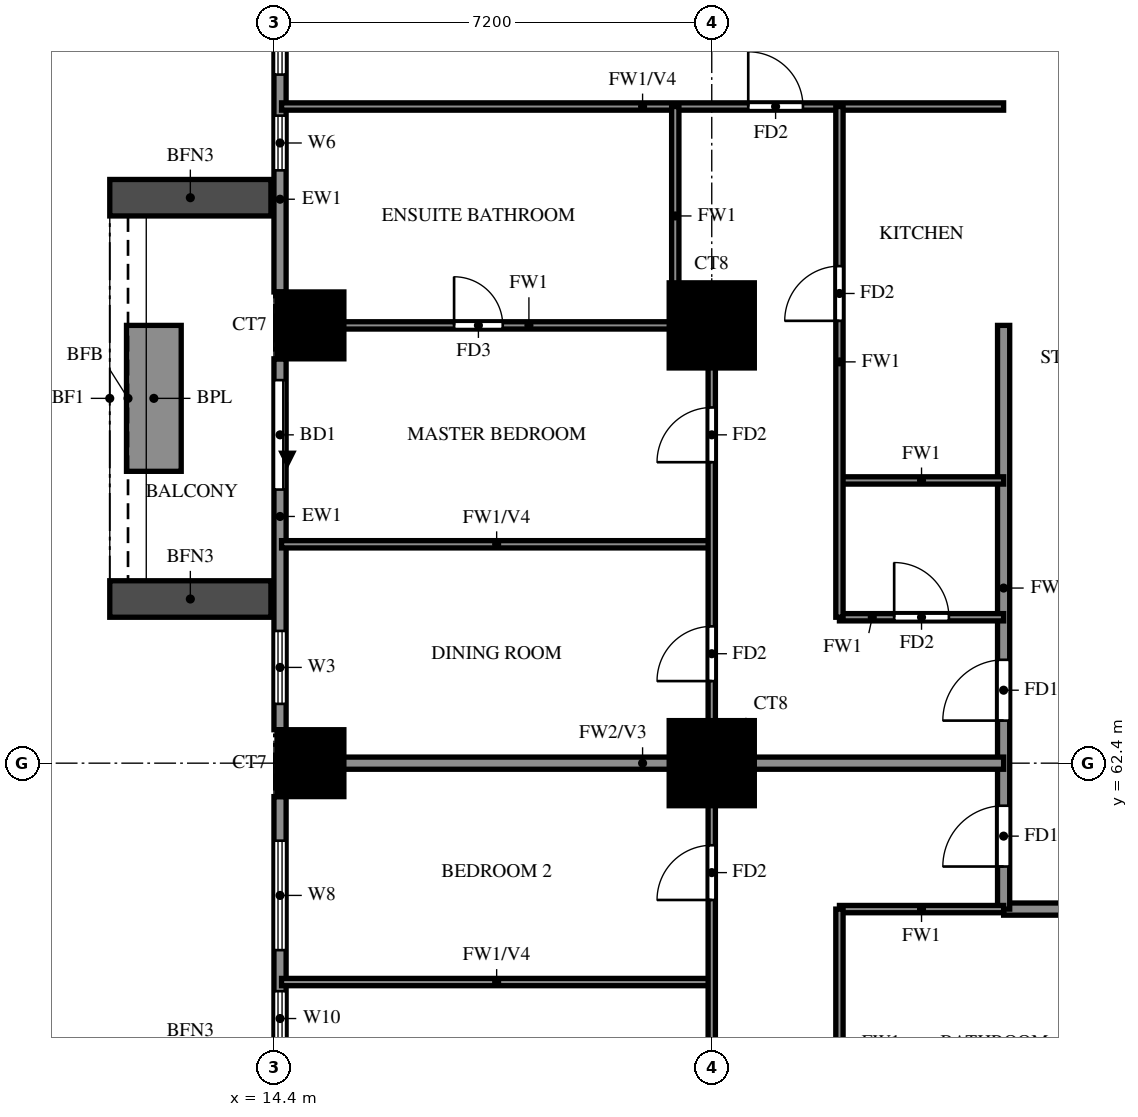
"""IFC4 building model, lengths in metres.
Left out: names, types, materials, properties, quantities, classifications, styles, units other than length and angle.
Written with IfcOpenShell. Run it as: python <this file> out.ifc"""

import sys

from ifc_helpers import new_model, si_unit, direction, frame, frame_2d, origin, origin_2d, place, context, subcontext, project, spatial, rectangle, extrude, source, transform, mapped, element, fill, save


model = new_model("IFC4")
c1 = context("Model", 3, precision=1e-05, world=origin(), true_north=direction((0.0, 1.0)))
c2 = subcontext(c1, "Body", "Model", "MODEL_VIEW")
j1 = project(units=[si_unit("LENGTHUNIT", "METRE"), si_unit("PLANEANGLEUNIT", "RADIAN")], contexts=[c1])
p1 = place(None, origin())
s1 = spatial("IfcSite", under=j1, at=p1, CompositionType="ELEMENT")
p2 = place(p1, origin())
s2 = spatial("IfcBuilding", under=s1, at=p2, CompositionType="ELEMENT")
p3 = place(p2, frame((0.0, 0.0, 34.0)))
s3 = spatial("IfcBuildingStorey", under=s2, at=p3, CompositionType="ELEMENT", Elevation=34.0)
m1 = source(origin(), c2, "Body", "SweptSolid", [
    extrude(rectangle(XDim=1.1, YDim=1.1, at=origin_2d()), origin(), (0.0, 0.0, 1.0), 3.18),
])
p4 = place(p3, frame((15.0, 62.4, 0.0), z_axis=(0.0, 0.0, 1.0), x_axis=(1.0, 0.0, 0.0)))
e1 = element("IfcColumn", 1, at=p4, inside=s3, PredefinedType="COLUMN", context=c2, shape_type="MappedRepresentation", body=[
    mapped(m1, transform((0.0, 0.0, 0.0))),
])
m2 = source(origin(), c2, "Body", "SweptSolid", [
    extrude(rectangle(XDim=1.4, YDim=1.4, at=origin_2d()), origin(), (0.0, 0.0, 1.0), 3.18),
])
p5 = place(p3, frame((21.6, 62.4, 0.0), z_axis=(0.0, 0.0, 1.0), x_axis=(1.0, 0.0, 0.0)))
e2 = element("IfcColumn", 2, at=p5, inside=s3, PredefinedType="COLUMN", context=c2, shape_type="MappedRepresentation", body=[
    mapped(m2, transform((0.0, 0.0, 0.0))),
])
p6 = place(p3, frame((15.0, 69.6, 0.0), z_axis=(0.0, 0.0, 1.0), x_axis=(1.0, 0.0, 0.0)))
e3 = element("IfcColumn", 3, at=p6, inside=s3, PredefinedType="COLUMN", context=c2, shape_type="MappedRepresentation", body=[
    mapped(m1, transform((0.0, 0.0, 0.0))),
])
p7 = place(p3, frame((21.6, 69.6, 0.0), z_axis=(0.0, 0.0, 1.0), x_axis=(1.0, 0.0, 0.0)))
e4 = element("IfcColumn", 4, at=p7, inside=s3, PredefinedType="COLUMN", context=c2, shape_type="MappedRepresentation", body=[
    mapped(m2, transform((0.0, 0.0, 0.0))),
])
p8 = place(p3, frame((14.5, 76.25, 0.0), z_axis=(0.0, 0.0, 1.0), x_axis=(0.0, -1.0, 0.0)))
e5 = element("IfcWall", 5, at=p8, inside=s3, PredefinedType="SOLIDWALL", context=c2, shape_type="SweptSolid", body=[
    extrude(rectangle(XDim=6.1, YDim=0.2, at=frame_2d((3.05, 0.0))), origin(), (0.0, 0.0, 1.0), 3.18),
])
p9 = place(p8, frame((3.2, 0.0, 1.5)))
e6 = element("IfcOpeningElement", 6, at=p9, cuts=e5, PredefinedType="OPENING", context=c2, shape_type="SweptSolid", body=[
    extrude(rectangle(XDim=0.9, YDim=0.9, at=frame_2d((0.45, 0.45))), frame((0.0, 0.11, 0.0), z_axis=(0.0, -1.0, 0.0), x_axis=(1.0, 0.0, 0.0)), (0.0, 0.0, 1.0), 0.22),
])
p10 = place(p8, frame((0.725, 0.0, 0.6)))
e7 = element("IfcOpeningElement", 7, at=p10, cuts=e5, PredefinedType="OPENING", context=c2, shape_type="SweptSolid", body=[
    extrude(rectangle(XDim=1.8, YDim=2.4, at=frame_2d((0.9, 1.2))), frame((0.0, 0.11, 0.0), z_axis=(0.0, -1.0, 0.0), x_axis=(1.0, 0.0, 0.0)), (0.0, 0.0, 1.0), 0.22),
])
p11 = place(p3, frame((14.5, 69.05, 0.0), z_axis=(0.0, 0.0, 1.0), x_axis=(0.0, -1.0, 0.0)))
e8 = element("IfcWall", 8, at=p11, inside=s3, PredefinedType="SOLIDWALL", context=c2, shape_type="SweptSolid", body=[
    extrude(rectangle(XDim=6.1, YDim=0.2, at=frame_2d((3.05, 0.0))), origin(), (0.0, 0.0, 1.0), 3.18),
])
p12 = place(p11, frame((0.35, 0.0, 0.0)))
e9 = element("IfcOpeningElement", 9, at=p12, cuts=e8, PredefinedType="OPENING", context=c2, shape_type="SweptSolid", body=[
    extrude(rectangle(XDim=1.8, YDim=2.4, at=frame_2d((0.9, 1.2))), frame((0.0, 0.11, 0.0), z_axis=(0.0, -1.0, 0.0), x_axis=(1.0, 0.0, 0.0)), (0.0, 0.0, 1.0), 0.22),
])
p13 = place(p11, frame((4.475, 0.0, 0.6)))
e10 = element("IfcOpeningElement", 10, at=p13, cuts=e8, PredefinedType="OPENING", context=c2, shape_type="SweptSolid", body=[
    extrude(rectangle(XDim=1.2, YDim=2.4, at=frame_2d((0.6, 1.2))), frame((0.0, 0.11, 0.0), z_axis=(0.0, -1.0, 0.0), x_axis=(1.0, 0.0, 0.0)), (0.0, 0.0, 1.0), 0.22),
])
p14 = place(p3, frame((14.5, 61.85, 0.0), z_axis=(0.0, 0.0, 1.0), x_axis=(0.0, -1.0, 0.0)))
e11 = element("IfcWall", 11, at=p14, inside=s3, PredefinedType="SOLIDWALL", context=c2, shape_type="SweptSolid", body=[
    extrude(rectangle(XDim=6.1, YDim=0.2, at=frame_2d((3.05, 0.0))), origin(), (0.0, 0.0, 1.0), 3.18),
])
p15 = place(p14, frame((3.2, 0.0, 0.6)))
e12 = element("IfcOpeningElement", 12, at=p15, cuts=e11, PredefinedType="OPENING", context=c2, shape_type="SweptSolid", body=[
    extrude(rectangle(XDim=0.9, YDim=2.4, at=frame_2d((0.45, 1.2))), frame((0.0, 0.11, 0.0), z_axis=(0.0, -1.0, 0.0), x_axis=(1.0, 0.0, 0.0)), (0.0, 0.0, 1.0), 0.22),
])
p16 = place(p14, frame((0.725, 0.0, 0.6)))
e13 = element("IfcOpeningElement", 13, at=p16, cuts=e11, PredefinedType="OPENING", context=c2, shape_type="SweptSolid", body=[
    extrude(rectangle(XDim=1.8, YDim=2.4, at=frame_2d((0.9, 1.2))), frame((0.0, 0.11, 0.0), z_axis=(0.0, -1.0, 0.0), x_axis=(1.0, 0.0, 0.0)), (0.0, 0.0, 1.0), 0.22),
])
for number, where, z_axis, x_axis in (
    (14, (14.35, 71.7, 0.0), (0.0, 0.0, 1.0), (-1.0, 0.0, 0.0)),
    (15, (14.35, 65.1, 0.0), (0.0, 0.0, 1.0), (-1.0, 0.0, 0.0)),
):
    element("IfcWall", number, at=place(p3, frame(where, z_axis=z_axis, x_axis=x_axis)), inside=s3, PredefinedType="SOLIDWALL", context=c2, shape_type="SweptSolid", body=[
        extrude(rectangle(XDim=2.65, YDim=0.6, at=frame_2d((1.325, 0.0))), origin(), (0.0, 0.0, 1.0), 2.85),
    ])
p17 = place(p3, frame((12.425, 69.6, 0.0), z_axis=(0.0, 0.0, 1.0), x_axis=(0.0, -1.0, 0.0)))
e16 = element("IfcWall", 16, at=p17, inside=s3, PredefinedType="SOLIDWALL", context=c2, shape_type="SweptSolid", body=[
    extrude(rectangle(XDim=2.4, YDim=0.9, at=frame_2d((1.2, 0.0))), origin(), (0.0, 0.0, 1.0), 0.9),
])
p18 = place(p3, frame((26.4, 60.0, 0.0), z_axis=(0.0, 0.0, 1.0), x_axis=(1.0, 0.0, 0.0)))
e17 = element("IfcWall", 17, at=p18, inside=s3, PredefinedType="SOLIDWALL", context=c2, shape_type="SweptSolid", body=[
    extrude(rectangle(XDim=7.2, YDim=0.2, at=frame_2d((3.6, 0.0))), origin(), (0.0, 0.0, 1.0), 3.18),
])
p19 = place(p3, frame((26.4, 60.0, 0.0), z_axis=(0.0, 0.0, 1.0), x_axis=(0.0, 1.0, 0.0)))
e18 = element("IfcWall", 18, at=p19, inside=s3, PredefinedType="SOLIDWALL", context=c2, shape_type="SweptSolid", body=[
    extrude(rectangle(XDim=9.6, YDim=0.2, at=frame_2d((4.8, 0.0))), origin(), (0.0, 0.0, 1.0), 3.18),
])
p20 = place(p19, frame((0.7, 0.0, 0.0)))
e19 = element("IfcOpeningElement", 19, at=p20, cuts=e18, PredefinedType="OPENING", context=c2, shape_type="SweptSolid", body=[
    extrude(rectangle(XDim=1.0, YDim=2.1, at=frame_2d((0.5, 1.05))), frame((0.0, 0.11, 0.0), z_axis=(0.0, -1.0, 0.0), x_axis=(1.0, 0.0, 0.0)), (0.0, 0.0, 1.0), 0.22),
])
p21 = place(p19, frame((3.1, 0.0, 0.0)))
e20 = element("IfcOpeningElement", 20, at=p21, cuts=e18, PredefinedType="OPENING", context=c2, shape_type="SweptSolid", body=[
    extrude(rectangle(XDim=1.0, YDim=2.1, at=frame_2d((0.5, 1.05))), frame((0.0, 0.11, 0.0), z_axis=(0.0, -1.0, 0.0), x_axis=(1.0, 0.0, 0.0)), (0.0, 0.0, 1.0), 0.22),
])
p22 = place(p3, frame((14.525, 62.4, 0.0), z_axis=(0.0, 0.0, 1.0), x_axis=(1.0, 0.0, 0.0)))
e21 = element("IfcWall", 21, at=p22, inside=s3, PredefinedType="SOLIDWALL", context=c2, shape_type="SweptSolid", body=[
    extrude(rectangle(XDim=11.875, YDim=0.2, at=frame_2d((5.938, 0.0))), origin(), (0.0, 0.0, 1.0), 3.18),
])
p23 = place(p3, frame((14.525, 58.8, 0.0), z_axis=(0.0, 0.0, 1.0), x_axis=(1.0, 0.0, 0.0)))
e22 = element("IfcWall", 22, at=p23, inside=s3, PredefinedType="PARTITIONING", context=c2, shape_type="SweptSolid", body=[
    extrude(rectangle(XDim=7.075, YDim=0.12, at=frame_2d((3.538, 0.0))), origin(), (0.0, 0.0, 1.0), 2.28),
])
p24 = place(p3, frame((23.7, 60.0, 0.0), z_axis=(0.0, 0.0, 1.0), x_axis=(1.0, 0.0, 0.0)))
e23 = element("IfcWall", 23, at=p24, inside=s3, PredefinedType="PARTITIONING", context=c2, shape_type="SweptSolid", body=[
    extrude(rectangle(XDim=2.7, YDim=0.12, at=frame_2d((1.35, 0.0))), origin(), (0.0, 0.0, 1.0), 3.18),
])
p25 = place(p3, frame((23.7, 64.8, 0.0), z_axis=(0.0, 0.0, 1.0), x_axis=(1.0, 0.0, 0.0)))
e24 = element("IfcWall", 24, at=p25, inside=s3, PredefinedType="PARTITIONING", context=c2, shape_type="SweptSolid", body=[
    extrude(rectangle(XDim=2.7, YDim=0.12, at=frame_2d((1.35, 0.0))), origin(), (0.0, 0.0, 1.0), 3.18),
])
p26 = place(p25, frame((0.9, 0.0, 0.0)))
e25 = element("IfcOpeningElement", 25, at=p26, cuts=e24, PredefinedType="OPENING", context=c2, shape_type="SweptSolid", body=[
    extrude(rectangle(XDim=0.9, YDim=2.1, at=frame_2d((0.45, 1.05))), frame((0.0, 0.07, 0.0), z_axis=(0.0, -1.0, 0.0), x_axis=(1.0, 0.0, 0.0)), (0.0, 0.0, 1.0), 0.14),
])
p27 = place(p3, frame((14.525, 66.0, 0.0), z_axis=(0.0, 0.0, 1.0), x_axis=(1.0, 0.0, 0.0)))
e26 = element("IfcWall", 26, at=p27, inside=s3, PredefinedType="PARTITIONING", context=c2, shape_type="SweptSolid", body=[
    extrude(rectangle(XDim=7.075, YDim=0.12, at=frame_2d((3.538, 0.0))), origin(), (0.0, 0.0, 1.0), 2.28),
])
p28 = place(p3, frame((23.7, 67.05, 0.0), z_axis=(0.0, 0.0, 1.0), x_axis=(1.0, 0.0, 0.0)))
e27 = element("IfcWall", 27, at=p28, inside=s3, PredefinedType="PARTITIONING", context=c2, shape_type="SweptSolid", body=[
    extrude(rectangle(XDim=2.7, YDim=0.12, at=frame_2d((1.35, 0.0))), origin(), (0.0, 0.0, 1.0), 3.18),
])
p29 = place(p3, frame((14.525, 69.6, 0.0), z_axis=(0.0, 0.0, 1.0), x_axis=(1.0, 0.0, 0.0)))
e28 = element("IfcWall", 28, at=p29, inside=s3, PredefinedType="PARTITIONING", context=c2, shape_type="SweptSolid", body=[
    extrude(rectangle(XDim=7.075, YDim=0.12, at=frame_2d((3.538, 0.0))), origin(), (0.0, 0.0, 1.0), 3.18),
])
p30 = place(p29, frame((2.837, 0.0, 0.0)))
e29 = element("IfcOpeningElement", 29, at=p30, cuts=e28, PredefinedType="OPENING", context=c2, shape_type="SweptSolid", body=[
    extrude(rectangle(XDim=0.8, YDim=2.1, at=frame_2d((0.4, 1.05))), frame((0.0, 0.07, 0.0), z_axis=(0.0, -1.0, 0.0), x_axis=(1.0, 0.0, 0.0)), (0.0, 0.0, 1.0), 0.14),
])
p31 = place(p3, frame((14.525, 73.2, 0.0), z_axis=(0.0, 0.0, 1.0), x_axis=(1.0, 0.0, 0.0)))
e30 = element("IfcWall", 30, at=p31, inside=s3, PredefinedType="PARTITIONING", context=c2, shape_type="SweptSolid", body=[
    extrude(rectangle(XDim=11.875, YDim=0.12, at=frame_2d((5.938, 0.0))), origin(), (0.0, 0.0, 1.0), 2.28),
])
p32 = place(p31, frame((7.675, 0.0, 0.0)))
e31 = element("IfcOpeningElement", 31, at=p32, cuts=e30, PredefinedType="OPENING", context=c2, shape_type="SweptSolid", body=[
    extrude(rectangle(XDim=0.9, YDim=2.1, at=frame_2d((0.45, 1.05))), frame((0.0, 0.07, 0.0), z_axis=(0.0, -1.0, 0.0), x_axis=(1.0, 0.0, 0.0)), (0.0, 0.0, 1.0), 0.14),
])
p33 = place(p3, frame((21.0, 69.6, 0.0), z_axis=(0.0, 0.0, 1.0), x_axis=(0.0, 1.0, 0.0)))
e32 = element("IfcWall", 32, at=p33, inside=s3, PredefinedType="PARTITIONING", context=c2, shape_type="SweptSolid", body=[
    extrude(rectangle(XDim=3.6, YDim=0.12, at=frame_2d((1.8, 0.0))), origin(), (0.0, 0.0, 1.0), 3.18),
])
p34 = place(p3, frame((21.6, 33.725, 0.0), z_axis=(0.0, 0.0, 1.0), x_axis=(0.0, 1.0, 0.0)))
e33 = element("IfcWall", 33, at=p34, inside=s3, PredefinedType="PARTITIONING", context=c2, shape_type="SweptSolid", body=[
    extrude(rectangle(XDim=35.875, YDim=0.12, at=frame_2d((17.938, 0.0))), origin(), (0.0, 0.0, 1.0), 3.18),
])
p35 = place(p34, frame((7.775, 0.0, 0.0)))
e34 = element("IfcOpeningElement", 34, at=p35, cuts=e33, PredefinedType="OPENING", context=c2, shape_type="SweptSolid", body=[
    extrude(rectangle(XDim=0.9, YDim=2.1, at=frame_2d((0.45, 1.05))), frame((0.0, 0.07, 0.0), z_axis=(0.0, -1.0, 0.0), x_axis=(1.0, 0.0, 0.0)), (0.0, 0.0, 1.0), 0.14),
])
p36 = place(p34, frame((15.625, 0.0, 0.0)))
e35 = element("IfcOpeningElement", 35, at=p36, cuts=e33, PredefinedType="OPENING", context=c2, shape_type="SweptSolid", body=[
    extrude(rectangle(XDim=0.9, YDim=2.1, at=frame_2d((0.45, 1.05))), frame((0.0, 0.07, 0.0), z_axis=(0.0, -1.0, 0.0), x_axis=(1.0, 0.0, 0.0)), (0.0, 0.0, 1.0), 0.14),
])
p37 = place(p34, frame((22.225, 0.0, 0.0)))
e36 = element("IfcOpeningElement", 36, at=p37, cuts=e33, PredefinedType="OPENING", context=c2, shape_type="SweptSolid", body=[
    extrude(rectangle(XDim=1.5, YDim=2.1, at=frame_2d((0.75, 1.05))), frame((0.0, 0.07, 0.0), z_axis=(0.0, -1.0, 0.0), x_axis=(1.0, 0.0, 0.0)), (0.0, 0.0, 1.0), 0.14),
])
p38 = place(p34, frame((26.425, 0.0, 0.0)))
e37 = element("IfcOpeningElement", 37, at=p38, cuts=e33, PredefinedType="OPENING", context=c2, shape_type="SweptSolid", body=[
    extrude(rectangle(XDim=0.9, YDim=2.1, at=frame_2d((0.45, 1.05))), frame((0.0, 0.07, 0.0), z_axis=(0.0, -1.0, 0.0), x_axis=(1.0, 0.0, 0.0)), (0.0, 0.0, 1.0), 0.14),
])
p39 = place(p34, frame((30.025, 0.0, 0.0)))
e38 = element("IfcOpeningElement", 38, at=p39, cuts=e33, PredefinedType="OPENING", context=c2, shape_type="SweptSolid", body=[
    extrude(rectangle(XDim=0.9, YDim=2.1, at=frame_2d((0.45, 1.05))), frame((0.0, 0.07, 0.0), z_axis=(0.0, -1.0, 0.0), x_axis=(1.0, 0.0, 0.0)), (0.0, 0.0, 1.0), 0.14),
])
p40 = place(p34, frame((33.625, 0.0, 0.0)))
e39 = element("IfcOpeningElement", 39, at=p40, cuts=e33, PredefinedType="OPENING", context=c2, shape_type="SweptSolid", body=[
    extrude(rectangle(XDim=0.9, YDim=2.1, at=frame_2d((0.45, 1.05))), frame((0.0, 0.07, 0.0), z_axis=(0.0, -1.0, 0.0), x_axis=(1.0, 0.0, 0.0)), (0.0, 0.0, 1.0), 0.14),
])
p41 = place(p3, frame((23.7, 55.6, 0.0), z_axis=(0.0, 0.0, 1.0), x_axis=(0.0, 1.0, 0.0)))
e40 = element("IfcWall", 40, at=p41, inside=s3, PredefinedType="PARTITIONING", context=c2, shape_type="SweptSolid", body=[
    extrude(rectangle(XDim=4.4, YDim=0.12, at=frame_2d((2.2, 0.0))), origin(), (0.0, 0.0, 1.0), 3.18),
])
p42 = place(p3, frame((23.7, 64.8, 0.0), z_axis=(0.0, 0.0, 1.0), x_axis=(0.0, 1.0, 0.0)))
e41 = element("IfcWall", 41, at=p42, inside=s3, PredefinedType="PARTITIONING", context=c2, shape_type="SweptSolid", body=[
    extrude(rectangle(XDim=8.4, YDim=0.12, at=frame_2d((4.2, 0.0))), origin(), (0.0, 0.0, 1.0), 3.18),
])
p43 = place(p42, frame((4.875, 0.0, 0.0)))
e42 = element("IfcOpeningElement", 42, at=p43, cuts=e41, PredefinedType="OPENING", context=c2, shape_type="SweptSolid", body=[
    extrude(rectangle(XDim=0.9, YDim=2.1, at=frame_2d((0.45, 1.05))), frame((0.0, 0.07, 0.0), z_axis=(0.0, -1.0, 0.0), x_axis=(1.0, 0.0, 0.0)), (0.0, 0.0, 1.0), 0.14),
])
p44 = place(p9, origin())
e43 = element("IfcWindow", 43, at=p44, inside=s3, PartitioningType="SINGLE_PANEL", PredefinedType="WINDOW", context=c2, shape_type="SweptSolid", body=[
    extrude(rectangle(XDim=0.9, YDim=0.9, at=frame_2d((0.45, 0.45))), frame((0.0, 0.03, 0.0), z_axis=(0.0, -1.0, 0.0), x_axis=(1.0, 0.0, 0.0)), (0.0, 0.0, 1.0), 0.06),
])
fill(e6, e43)
p45 = place(p10, origin())
e44 = element("IfcWindow", 44, at=p45, inside=s3, PartitioningType="DOUBLE_PANEL_VERTICAL", PredefinedType="WINDOW", context=c2, shape_type="SweptSolid", body=[
    extrude(rectangle(XDim=1.8, YDim=2.4, at=frame_2d((0.9, 1.2))), frame((0.0, 0.03, 0.0), z_axis=(0.0, -1.0, 0.0), x_axis=(1.0, 0.0, 0.0)), (0.0, 0.0, 1.0), 0.06),
])
fill(e7, e44)
p46 = place(p12, origin())
e45 = element("IfcDoor", 45, at=p46, inside=s3, OperationType="DOUBLE_DOOR_SLIDING", PredefinedType="DOOR", context=c2, shape_type="SweptSolid", body=[
    extrude(rectangle(XDim=1.8, YDim=2.4, at=frame_2d((0.9, 1.2))), frame((0.0, 0.025, 0.0), z_axis=(0.0, -1.0, 0.0), x_axis=(1.0, 0.0, 0.0)), (0.0, 0.0, 1.0), 0.05),
])
fill(e9, e45)
p47 = place(p13, origin())
e46 = element("IfcWindow", 46, at=p47, inside=s3, PartitioningType="SINGLE_PANEL", PredefinedType="WINDOW", context=c2, shape_type="SweptSolid", body=[
    extrude(rectangle(XDim=1.2, YDim=2.4, at=frame_2d((0.6, 1.2))), frame((0.0, 0.03, 0.0), z_axis=(0.0, -1.0, 0.0), x_axis=(1.0, 0.0, 0.0)), (0.0, 0.0, 1.0), 0.06),
])
fill(e10, e46)
p48 = place(p15, origin())
e47 = element("IfcWindow", 47, at=p48, inside=s3, PartitioningType="SINGLE_PANEL", PredefinedType="WINDOW", context=c2, shape_type="SweptSolid", body=[
    extrude(rectangle(XDim=0.9, YDim=2.4, at=frame_2d((0.45, 1.2))), frame((0.0, 0.03, 0.0), z_axis=(0.0, -1.0, 0.0), x_axis=(1.0, 0.0, 0.0)), (0.0, 0.0, 1.0), 0.06),
])
fill(e12, e47)
p49 = place(p16, origin())
e48 = element("IfcWindow", 48, at=p49, inside=s3, PartitioningType="DOUBLE_PANEL_VERTICAL", PredefinedType="WINDOW", context=c2, shape_type="SweptSolid", body=[
    extrude(rectangle(XDim=1.8, YDim=2.4, at=frame_2d((0.9, 1.2))), frame((0.0, 0.03, 0.0), z_axis=(0.0, -1.0, 0.0), x_axis=(1.0, 0.0, 0.0)), (0.0, 0.0, 1.0), 0.06),
])
fill(e13, e48)
p50 = place(p20, origin())
e49 = element("IfcDoor", 49, at=p50, inside=s3, OperationType="SINGLE_SWING_RIGHT", PredefinedType="DOOR", context=c2, shape_type="SweptSolid", body=[
    extrude(rectangle(XDim=1.0, YDim=2.1, at=frame_2d((0.5, 1.05))), frame((0.0, 0.025, 0.0), z_axis=(0.0, -1.0, 0.0), x_axis=(1.0, 0.0, 0.0)), (0.0, 0.0, 1.0), 0.05),
])
fill(e19, e49)
p51 = place(p38, origin())
e50 = element("IfcDoor", 50, at=p51, inside=s3, OperationType="SINGLE_SWING_RIGHT", PredefinedType="DOOR", context=c2, shape_type="SweptSolid", body=[
    extrude(rectangle(XDim=0.9, YDim=2.1, at=frame_2d((0.45, 1.05))), frame((0.0, 0.025, 0.0), z_axis=(0.0, -1.0, 0.0), x_axis=(1.0, 0.0, 0.0)), (0.0, 0.0, 1.0), 0.05),
])
fill(e37, e50)
p52 = place(p21, origin())
e51 = element("IfcDoor", 51, at=p52, inside=s3, OperationType="SINGLE_SWING_LEFT", PredefinedType="DOOR", context=c2, shape_type="SweptSolid", body=[
    extrude(rectangle(XDim=1.0, YDim=2.1, at=frame_2d((0.5, 1.05))), frame((0.0, 0.025, 0.0), z_axis=(0.0, -1.0, 0.0), x_axis=(1.0, 0.0, 0.0)), (0.0, 0.0, 1.0), 0.05),
])
fill(e20, e51)
p53 = place(p39, origin())
e52 = element("IfcDoor", 52, at=p53, inside=s3, OperationType="SINGLE_SWING_LEFT", PredefinedType="DOOR", context=c2, shape_type="SweptSolid", body=[
    extrude(rectangle(XDim=0.9, YDim=2.1, at=frame_2d((0.45, 1.05))), frame((0.0, 0.025, 0.0), z_axis=(0.0, -1.0, 0.0), x_axis=(1.0, 0.0, 0.0)), (0.0, 0.0, 1.0), 0.05),
])
fill(e38, e52)
p54 = place(p40, origin())
e53 = element("IfcDoor", 53, at=p54, inside=s3, OperationType="SINGLE_SWING_RIGHT", PredefinedType="DOOR", context=c2, shape_type="SweptSolid", body=[
    extrude(rectangle(XDim=0.9, YDim=2.1, at=frame_2d((0.45, 1.05))), frame((0.0, 0.025, 0.0), z_axis=(0.0, -1.0, 0.0), x_axis=(1.0, 0.0, 0.0)), (0.0, 0.0, 1.0), 0.05),
])
fill(e39, e53)
p55 = place(p30, origin())
e54 = element("IfcDoor", 54, at=p55, inside=s3, OperationType="SINGLE_SWING_LEFT", PredefinedType="DOOR", context=c2, shape_type="SweptSolid", body=[
    extrude(rectangle(XDim=0.8, YDim=2.1, at=frame_2d((0.4, 1.05))), frame((0.0, 0.025, 0.0), z_axis=(0.0, -1.0, 0.0), x_axis=(1.0, 0.0, 0.0)), (0.0, 0.0, 1.0), 0.05),
])
fill(e29, e54)
p56 = place(p32, origin())
e55 = element("IfcDoor", 55, at=p56, inside=s3, OperationType="SINGLE_SWING_LEFT", PredefinedType="DOOR", context=c2, shape_type="SweptSolid", body=[
    extrude(rectangle(XDim=0.9, YDim=2.1, at=frame_2d((0.45, 1.05))), frame((0.0, 0.025, 0.0), z_axis=(0.0, -1.0, 0.0), x_axis=(1.0, 0.0, 0.0)), (0.0, 0.0, 1.0), 0.05),
])
fill(e31, e55)
p57 = place(p26, origin())
e56 = element("IfcDoor", 56, at=p57, inside=s3, OperationType="SINGLE_SWING_RIGHT", PredefinedType="DOOR", context=c2, shape_type="SweptSolid", body=[
    extrude(rectangle(XDim=0.9, YDim=2.1, at=frame_2d((0.45, 1.05))), frame((0.0, 0.025, 0.0), z_axis=(0.0, -1.0, 0.0), x_axis=(1.0, 0.0, 0.0)), (0.0, 0.0, 1.0), 0.05),
])
fill(e25, e56)
p58 = place(p43, origin())
e57 = element("IfcDoor", 57, at=p58, inside=s3, OperationType="SINGLE_SWING_LEFT", PredefinedType="DOOR", context=c2, shape_type="SweptSolid", body=[
    extrude(rectangle(XDim=0.9, YDim=2.1, at=frame_2d((0.45, 1.05))), frame((0.0, 0.025, 0.0), z_axis=(0.0, -1.0, 0.0), x_axis=(1.0, 0.0, 0.0)), (0.0, 0.0, 1.0), 0.05),
])
fill(e42, e57)
save(model, sys.argv[1])
